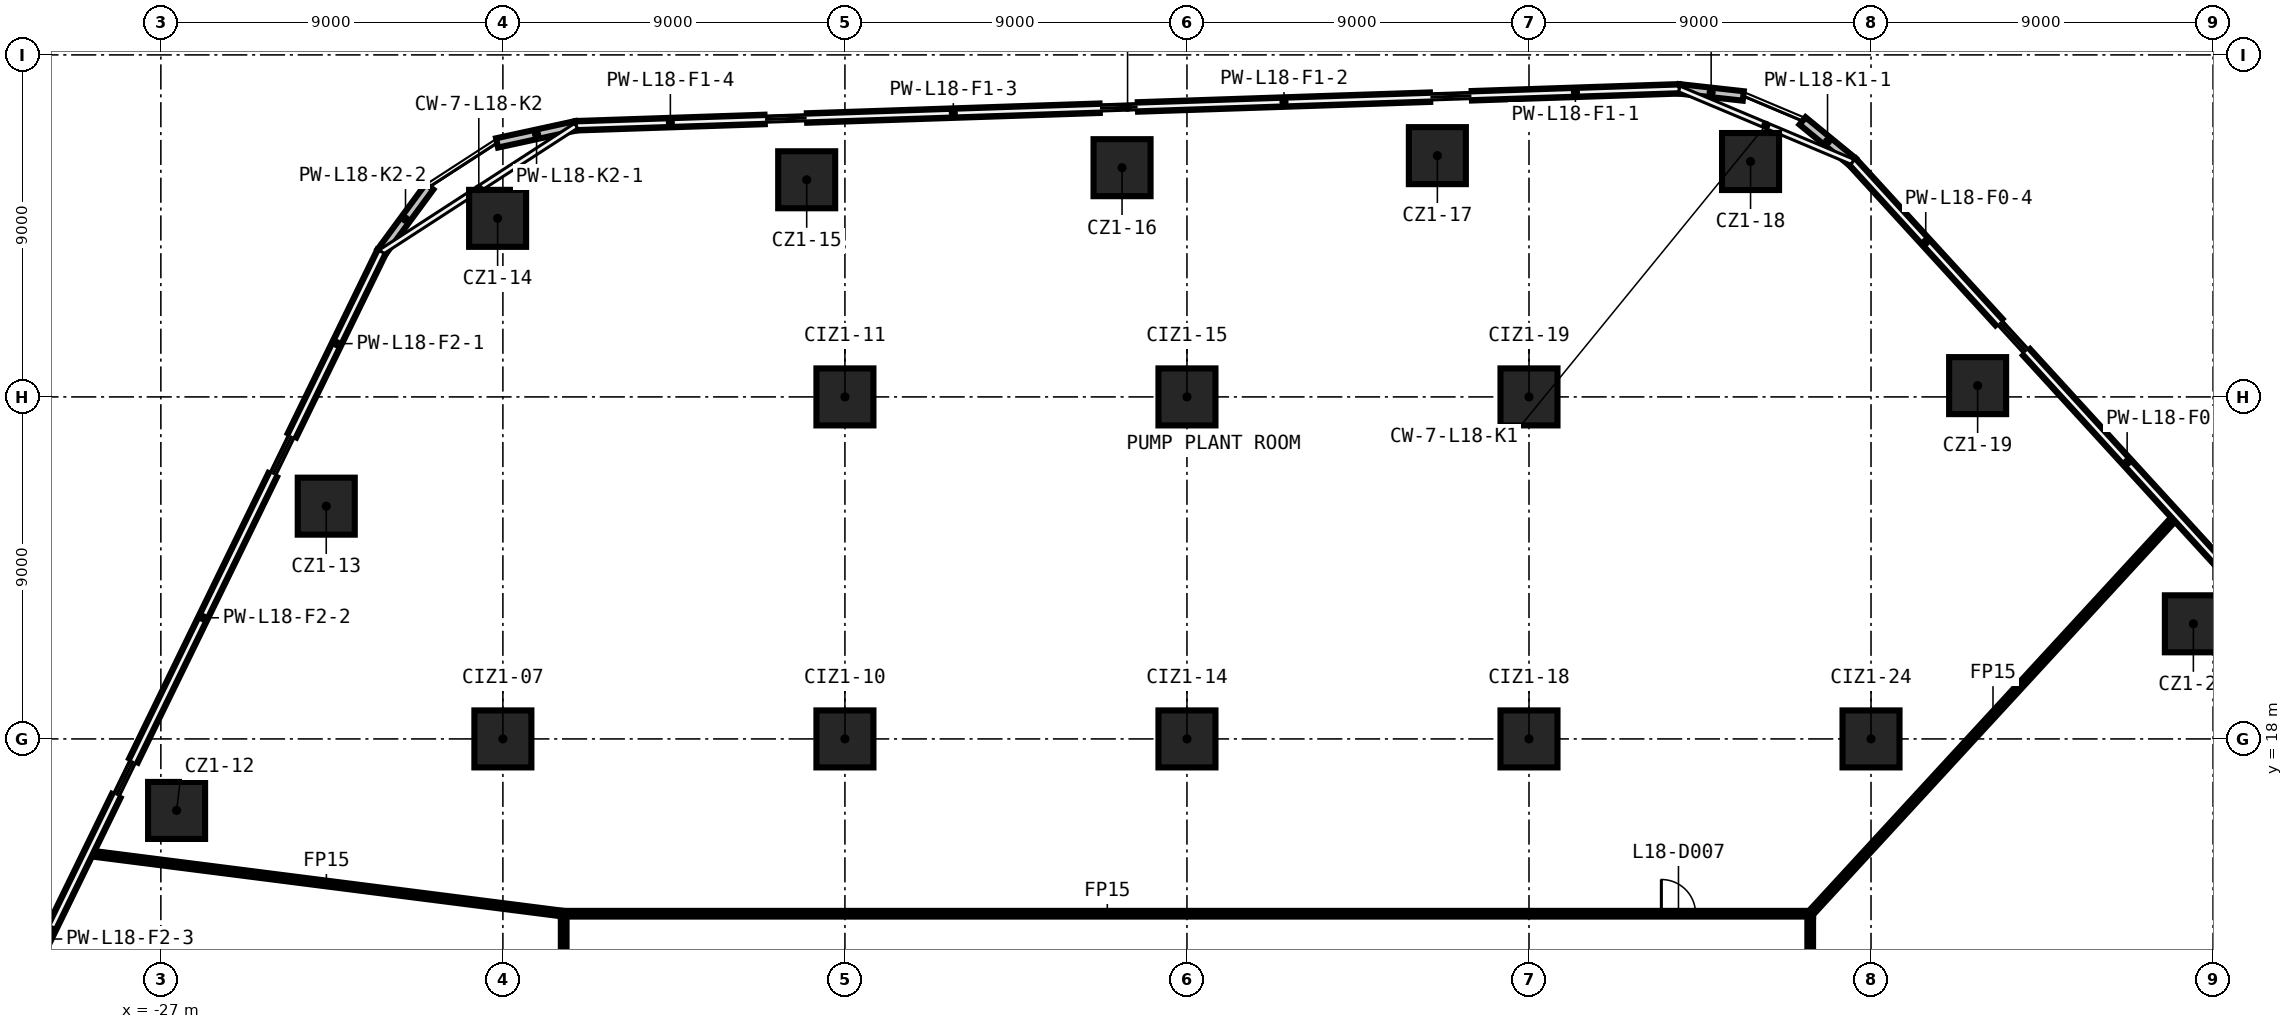
"""IFC4 building model, lengths in metres.
Left out: names, types, materials, properties, quantities, classifications, styles, units other than length and angle.
Written with IfcOpenShell. Run it as: python <this file> out.ifc"""

import sys

from ifc_helpers import new_model, si_unit, direction, frame, frame_2d, origin, origin_2d, place, context, subcontext, project, spatial, rectangle, extrude, element, fill, save


model = new_model("IFC4")
c1 = context("Model", 3, precision=1e-05, world=origin(), true_north=direction((0.0, 1.0)))
c2 = subcontext(c1, "Body", "Model", "MODEL_VIEW")
j1 = project(units=[si_unit("LENGTHUNIT", "METRE"), si_unit("PLANEANGLEUNIT", "RADIAN")], contexts=[c1])
p1 = place(None, origin())
s1 = spatial("IfcSite", under=j1, at=p1, CompositionType="ELEMENT")
p2 = place(p1, origin())
s2 = spatial("IfcBuilding", under=s1, at=p2, CompositionType="ELEMENT")
p3 = place(p2, frame((0.0, 0.0, 89.2)))
s3 = spatial("IfcBuildingStorey", under=s2, at=p3, CompositionType="ELEMENT", Elevation=89.2)
for number, where, z_axis, x_axis in (
    (1, (-26.586, 16.118, 0.0), (0.0, 0.0, 1.0), (1.0, 0.0, 0.0)),
    (2, (-22.648, 24.125, 0.0), (0.0, 0.0, 1.0), (1.0, 0.0, 0.0)),
    (3, (-18.139, 31.699, 0.0), (0.0, 0.0, 1.0), (1.0, 0.0, 0.0)),
    (4, (-10.006, 32.714, 0.0), (0.0, 0.0, 1.0), (1.0, 0.0, 0.0)),
    (5, (-1.708, 33.032, 0.0), (0.0, 0.0, 1.0), (1.0, 0.0, 0.0)),
    (6, (6.589, 33.349, 0.0), (0.0, 0.0, 1.0), (1.0, 0.0, 0.0)),
    (7, (14.83, 33.194, 0.0), (0.0, 0.0, 1.0), (1.0, 0.0, 0.0)),
    (8, (20.805, 27.297, 0.0), (0.0, 0.0, 1.0), (1.0, 0.0, 0.0)),
    (9, (26.482, 21.029, 0.0), (0.0, 0.0, 1.0), (1.0, 0.0, 0.0)),
    (10, (-18.0, 18.0, 0.0), (0.0, 0.0, 1.0), (1.0, 0.0, 0.0)),
    (11, (-9.0, 18.0, 0.0), (0.0, 0.0, 1.0), (1.0, 0.0, 0.0)),
    (12, (-9.0, 27.0, 0.0), (0.0, 0.0, 1.0), (1.0, 0.0, 0.0)),
    (13, (0.0, 18.0, 0.0), (0.0, 0.0, 1.0), (1.0, 0.0, 0.0)),
    (14, (0.0, 27.0, 0.0), (0.0, 0.0, 1.0), (1.0, 0.0, 0.0)),
    (15, (9.0, 18.0, 0.0), (0.0, 0.0, 1.0), (1.0, 0.0, 0.0)),
    (16, (9.0, 27.0, 0.0), (0.0, 0.0, 1.0), (1.0, 0.0, 0.0)),
    (17, (18.0, 18.0, 0.0), (0.0, 0.0, 1.0), (1.0, 0.0, 0.0)),
):
    element("IfcColumn", number, at=place(p3, frame(where, z_axis=z_axis, x_axis=x_axis)), inside=s3, PredefinedType="COLUMN", context=c2, shape_type="SweptSolid", body=[
        extrude(rectangle(XDim=1.5, YDim=1.5, at=origin_2d()), origin(), (0.0, 0.0, 1.0), 5.55),
    ])
p4 = place(p3, frame((-16.475, 13.4, 0.0), z_axis=(0.0, 0.0, 1.0), x_axis=(1.0, 0.0, 0.0)))
e18 = element("IfcWall", 18, at=p4, inside=s3, PredefinedType="PARTITIONING", context=c2, shape_type="SweptSolid", body=[
    extrude(rectangle(XDim=32.95, YDim=0.15, at=frame_2d((16.475, 0.0))), origin(), (0.0, 0.0, 1.0), 5.55),
])
p5 = place(p4, frame((28.958, 0.0, 0.0)))
e19 = element("IfcOpeningElement", 19, at=p5, cuts=e18, PredefinedType="OPENING", context=c2, shape_type="SweptSolid", body=[
    extrude(rectangle(XDim=0.9, YDim=2.1, at=frame_2d((0.45, 1.05))), frame((0.0, 0.085, 0.0), z_axis=(0.0, -1.0, 0.0), x_axis=(1.0, 0.0, 0.0)), (0.0, 0.0, 1.0), 0.17),
])
p6 = place(p3, frame((16.4, 13.4, 0.0), z_axis=(0.0, 0.0, 1.0), x_axis=(0.67725276206, 0.735750430705, 0.0)))
e20 = element("IfcWall", 20, at=p6, inside=s3, PredefinedType="PARTITIONING", context=c2, shape_type="SweptSolid", body=[
    extrude(rectangle(XDim=14.202, YDim=0.15, at=frame_2d((7.101, 0.0))), origin(), (0.0, 0.0, 1.0), 5.55),
])
p7 = place(p3, frame((16.4, 13.325, 0.0), z_axis=(0.0, 0.0, 1.0), x_axis=(0.0, -1.0, 0.0)))
e21 = element("IfcWall", 21, at=p7, inside=s3, PredefinedType="PARTITIONING", context=c2, shape_type="SweptSolid", body=[
    extrude(rectangle(XDim=26.65, YDim=0.15, at=frame_2d((13.325, 0.0))), origin(), (0.0, 0.0, 1.0), 5.55),
])
p8 = place(p7, frame((15.952, 0.0, 0.0)))
e22 = element("IfcOpeningElement", 22, at=p8, cuts=e21, PredefinedType="OPENING", context=c2, shape_type="SweptSolid", body=[
    extrude(rectangle(XDim=0.9, YDim=2.1, at=frame_2d((0.45, 1.05))), frame((0.0, 0.085, 0.0), z_axis=(0.0, -1.0, 0.0), x_axis=(1.0, 0.0, 0.0)), (0.0, 0.0, 1.0), 0.17),
])
p9 = place(p7, frame((9.969, 0.0, 0.0)))
e23 = element("IfcOpeningElement", 23, at=p9, cuts=e21, PredefinedType="OPENING", context=c2, shape_type="SweptSolid", body=[
    extrude(rectangle(XDim=0.9, YDim=2.1, at=frame_2d((0.45, 1.05))), frame((0.0, 0.085, 0.0), z_axis=(0.0, -1.0, 0.0), x_axis=(1.0, 0.0, 0.0)), (0.0, 0.0, 1.0), 0.17),
])
p10 = place(p7, frame((1.621, 0.0, 0.0)))
e24 = element("IfcOpeningElement", 24, at=p10, cuts=e21, PredefinedType="OPENING", context=c2, shape_type="SweptSolid", body=[
    extrude(rectangle(XDim=0.9, YDim=2.1, at=frame_2d((0.45, 1.05))), frame((0.0, 0.085, 0.0), z_axis=(0.0, -1.0, 0.0), x_axis=(1.0, 0.0, 0.0)), (0.0, 0.0, 1.0), 0.17),
])
p11 = place(p3, frame((-16.4, -13.325, 0.0), z_axis=(0.0, 0.0, 1.0), x_axis=(0.0, 1.0, 0.0)))
e25 = element("IfcWall", 25, at=p11, inside=s3, PredefinedType="PARTITIONING", context=c2, shape_type="SweptSolid", body=[
    extrude(rectangle(XDim=26.65, YDim=0.15, at=frame_2d((13.325, 0.0))), origin(), (0.0, 0.0, 1.0), 5.55),
])
p12 = place(p11, frame((1.621, 0.0, 0.0)))
e26 = element("IfcOpeningElement", 26, at=p12, cuts=e25, PredefinedType="OPENING", context=c2, shape_type="SweptSolid", body=[
    extrude(rectangle(XDim=0.9, YDim=2.1, at=frame_2d((0.45, 1.05))), frame((0.0, 0.085, 0.0), z_axis=(0.0, -1.0, 0.0), x_axis=(1.0, 0.0, 0.0)), (0.0, 0.0, 1.0), 0.17),
])
p13 = place(p11, frame((24.098, 0.0, 0.0)))
e27 = element("IfcOpeningElement", 27, at=p13, cuts=e25, PredefinedType="OPENING", context=c2, shape_type="SweptSolid", body=[
    extrude(rectangle(XDim=0.9, YDim=2.1, at=frame_2d((0.45, 1.05))), frame((0.0, 0.085, 0.0), z_axis=(0.0, -1.0, 0.0), x_axis=(1.0, 0.0, 0.0)), (0.0, 0.0, 1.0), 0.17),
])
p14 = place(p11, frame((19.088, 0.0, 0.0)))
e28 = element("IfcOpeningElement", 28, at=p14, cuts=e25, PredefinedType="OPENING", context=c2, shape_type="SweptSolid", body=[
    extrude(rectangle(XDim=0.9, YDim=2.1, at=frame_2d((0.45, 1.05))), frame((0.0, 0.085, 0.0), z_axis=(0.0, -1.0, 0.0), x_axis=(1.0, 0.0, 0.0)), (0.0, 0.0, 1.0), 0.17),
])
p15 = place(p3, frame((-28.888, 14.991, 0.0), z_axis=(0.0, 0.0, 1.0), x_axis=(0.991981829528, -0.126380575588, 0.0)))
e29 = element("IfcWall", 29, at=p15, inside=s3, PredefinedType="PARTITIONING", context=c2, shape_type="SweptSolid", body=[
    extrude(rectangle(XDim=12.589, YDim=0.15, at=frame_2d((6.295, 0.0))), origin(), (0.0, 0.0, 1.0), 5.55),
])
p16 = place(p3, frame((27.385, 22.384, 0.0), z_axis=(0.0, 0.0, 1.0), x_axis=(-0.674651504882, 0.738136401324, 0.0)))
e30 = element("IfcWall", 30, at=p16, inside=s3, PredefinedType="SOLIDWALL", context=c2, shape_type="SweptSolid", body=[
    extrude(rectangle(XDim=7.845, YDim=0.25, at=frame_2d((3.923, 0.0))), origin(), (0.0, 0.0, 1.0), 5.55),
])
p17 = place(p3, frame((21.366, 28.969, 0.0), z_axis=(0.0, 0.0, 1.0), x_axis=(-0.674655437401, 0.73813280701, 0.0)))
e31 = element("IfcWall", 31, at=p17, inside=s3, PredefinedType="SOLIDWALL", context=c2, shape_type="SweptSolid", body=[
    extrude(rectangle(XDim=5.711, YDim=0.25, at=frame_2d((2.856, 0.0))), origin(), (0.0, 0.0, 1.0), 5.55),
])
for number, where, z_axis, x_axis in (
    (32, (17.513, 33.185, 0.0), (0.0, 0.0, 1.0), (-0.774, 0.634, 0.0)),
    (33, (14.638, 34.919, 0.0), (0.0, 0.0, 1.0), (-0.994, 0.11, 0.0)),
):
    element("IfcWall", number, at=place(p3, frame(where, z_axis=z_axis, x_axis=x_axis)), inside=s3, PredefinedType="SOLIDWALL", context=c2, shape_type="SweptSolid", body=[
        extrude(rectangle(XDim=1.7, YDim=0.25, at=frame_2d((0.85, 0.0))), origin(), (0.0, 0.0, 1.0), 5.55),
    ])
p18 = place(p3, frame((12.948, 35.107, 0.0), z_axis=(0.0, 0.0, 1.0), x_axis=(-0.999441325856, -0.033422091074, 0.0)))
e34 = element("IfcWall", 34, at=p18, inside=s3, PredefinedType="SOLIDWALL", context=c2, shape_type="SweptSolid", body=[
    extrude(rectangle(XDim=5.457, YDim=0.25, at=frame_2d((2.728, 0.0))), origin(), (0.0, 0.0, 1.0), 5.55),
])
p19 = place(p3, frame((6.396, 34.887, 0.0), z_axis=(0.0, 0.0, 1.0), x_axis=(-0.99944120153, -0.033425808646, 0.0)))
e35 = element("IfcWall", 35, at=p19, inside=s3, PredefinedType="SOLIDWALL", context=c2, shape_type="SweptSolid", body=[
    extrude(rectangle(XDim=7.691, YDim=0.25, at=frame_2d((3.846, 0.0))), origin(), (0.0, 0.0, 1.0), 5.55),
])
p20 = place(p3, frame((-2.297, 34.597, 0.0), z_axis=(0.0, 0.0, 1.0), x_axis=(-0.999440043246, -0.033460423742, 0.0)))
e36 = element("IfcWall", 36, at=p20, inside=s3, PredefinedType="SOLIDWALL", context=c2, shape_type="SweptSolid", body=[
    extrude(rectangle(XDim=7.705, YDim=0.25, at=frame_2d((3.853, 0.0))), origin(), (0.0, 0.0, 1.0), 5.55),
])
p21 = place(p3, frame((-11.112, 34.302, 0.0), z_axis=(0.0, 0.0, 1.0), x_axis=(-0.999439161723, -0.033486743869, 0.0)))
e37 = element("IfcWall", 37, at=p21, inside=s3, PredefinedType="SOLIDWALL", context=c2, shape_type="SweptSolid", body=[
    extrude(rectangle(XDim=4.965, YDim=0.25, at=frame_2d((2.482, 0.0))), origin(), (0.0, 0.0, 1.0), 5.55),
])
for number, where, z_axis, x_axis in (
    (38, (-16.074, 34.135, 0.0), (0.0, 0.0, 1.0), (-0.977, -0.212, 0.0)),
    (39, (-19.932, 32.531, 0.0), (0.0, 0.0, 1.0), (-0.593, -0.805, 0.0)),
):
    element("IfcWall", number, at=place(p3, frame(where, z_axis=z_axis, x_axis=x_axis)), inside=s3, PredefinedType="SOLIDWALL", context=c2, shape_type="SweptSolid", body=[
        extrude(rectangle(XDim=2.128, YDim=0.25, at=frame_2d((1.064, 0.0))), origin(), (0.0, 0.0, 1.0), 5.55),
    ])
p22 = place(p3, frame((-21.193, 30.817, 0.0), z_axis=(0.0, 0.0, 1.0), x_axis=(-0.438321567633, -0.898818225977, 0.0)))
e40 = element("IfcWall", 40, at=p22, inside=s3, PredefinedType="SOLIDWALL", context=c2, shape_type="SweptSolid", body=[
    extrude(rectangle(XDim=5.373, YDim=0.25, at=frame_2d((2.687, 0.0))), origin(), (0.0, 0.0, 1.0), 5.55),
])
p23 = place(p3, frame((-24.057, 24.943, 0.0), z_axis=(0.0, 0.0, 1.0), x_axis=(-0.438344187068, -0.898807194933, 0.0)))
e41 = element("IfcWall", 41, at=p23, inside=s3, PredefinedType="SOLIDWALL", context=c2, shape_type="SweptSolid", body=[
    extrude(rectangle(XDim=8.355, YDim=0.25, at=frame_2d((4.178, 0.0))), origin(), (0.0, 0.0, 1.0), 5.55),
])
p24 = place(p3, frame((-28.175, 16.5, 0.0), z_axis=(0.0, 0.0, 1.0), x_axis=(-0.438332337133, -0.898812973996, 0.0)))
e42 = element("IfcWall", 42, at=p24, inside=s3, PredefinedType="SOLIDWALL", context=c2, shape_type="SweptSolid", body=[
    extrude(rectangle(XDim=8.377, YDim=0.25, at=frame_2d((4.189, 0.0))), origin(), (0.0, 0.0, 1.0), 5.55),
])
p25 = place(p5, origin())
e43 = element("IfcDoor", 43, at=p25, inside=s3, OperationType="SINGLE_SWING_RIGHT", PredefinedType="DOOR", context=c2, shape_type="SweptSolid", body=[
    extrude(rectangle(XDim=0.9, YDim=2.1, at=frame_2d((0.45, 1.05))), frame((0.0, 0.025, 0.0), z_axis=(0.0, -1.0, 0.0), x_axis=(1.0, 0.0, 0.0)), (0.0, 0.0, 1.0), 0.05),
])
fill(e19, e43)
save(model, sys.argv[1])
